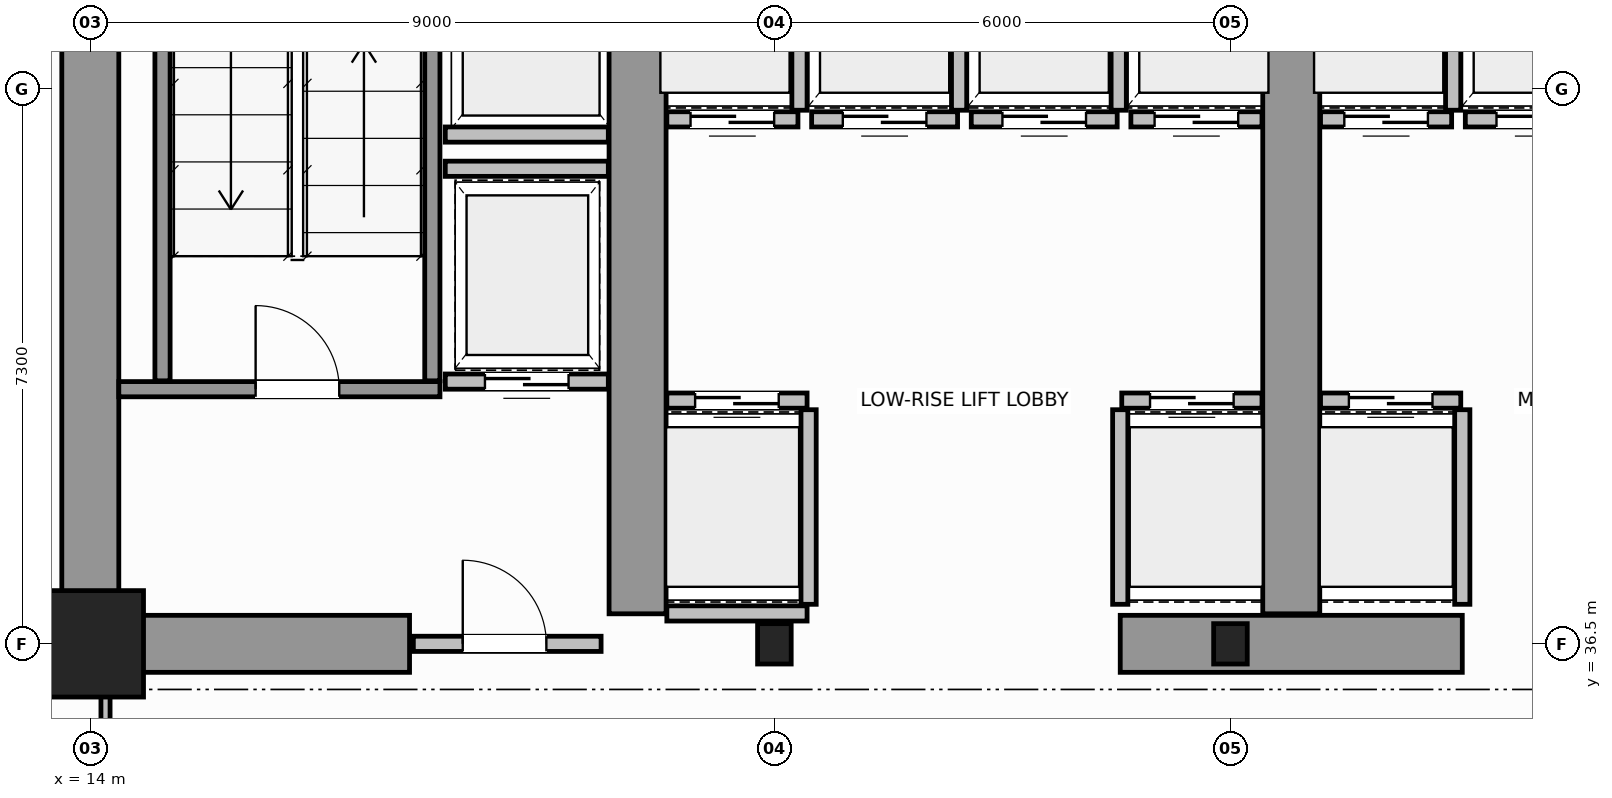
"""IFC4 building model, lengths in metres.
Left out: names, types, materials, properties, quantities, classifications, styles, units other than length and angle.
Written with IfcOpenShell. Run it as: python <this file> out.ifc"""

import sys

from ifc_helpers import new_model, si_unit, direction, frame, frame_2d, origin, origin_2d, place, context, subcontext, project, spatial, rectangle, i_section, extrude, source, transform, mapped, element, fill, save


model = new_model("IFC4")
c1 = context("Model", 3, precision=1e-05, world=origin(), true_north=direction((0.0, 1.0)))
c2 = subcontext(c1, "Body", "Model", "MODEL_VIEW")
j1 = project(units=[si_unit("LENGTHUNIT", "METRE"), si_unit("PLANEANGLEUNIT", "RADIAN")], contexts=[c1])
p1 = place(None, origin())
s1 = spatial("IfcSite", under=j1, at=p1, CompositionType="ELEMENT")
p2 = place(p1, origin())
s2 = spatial("IfcBuilding", under=s1, at=p2, CompositionType="ELEMENT")
p3 = place(p2, frame((0.0, 0.0, 99.6)))
s3 = spatial("IfcBuildingStorey", under=s2, at=p3, CompositionType="ELEMENT", Elevation=99.6)
m1 = source(origin(), c2, "Body", "SweptSolid", [
    extrude(rectangle(XDim=1.4, YDim=1.4, at=origin_2d()), origin(), (0.0, 0.0, 1.0), 3.8),
])
p4 = place(p3, frame((14.0, 36.5, 0.0), z_axis=(0.0, 0.0, 1.0), x_axis=(1.0, 0.0, 0.0)))
e1 = element("IfcColumn", 1, at=p4, inside=s3, PredefinedType="COLUMN", context=c2, shape_type="MappedRepresentation", body=[
    mapped(m1, transform((0.0, 0.0, 0.0), scale=1.0)),
])
m2 = source(origin(), c2, "Body", "SweptSolid", [
    extrude(i_section(OverallWidth=0.442, OverallDepth=0.531, WebThickness=0.065, FlangeThickness=0.076, FilletRadius=0.015, at=origin_2d()), origin(), (0.0, 0.0, 1.0), 3.8),
])
for number, where, z_axis, x_axis in (
    (2, (23.0, 36.5, 0.0), (0.0, 0.0, 1.0), (1.0, 0.0, 0.0)),
    (3, (29.0, 36.5, 0.0), (0.0, 0.0, 1.0), (1.0, 0.0, 0.0)),
):
    element("IfcColumn", number, at=place(p3, frame(where, z_axis=z_axis, x_axis=x_axis)), inside=s3, PredefinedType="COLUMN", context=c2, shape_type="MappedRepresentation", body=[
        mapped(m2, transform((0.0, 0.0, 0.0), scale=1.0)),
    ])
p5 = place(p3, frame((14.0, 36.5, 0.0), z_axis=(0.0, 0.0, 1.0), x_axis=(0.0, 1.0, 0.0)))
e4 = element("IfcWall", 4, at=p5, inside=s3, PredefinedType="SHEAR", context=c2, shape_type="SweptSolid", body=[
    extrude(rectangle(XDim=14.5, YDim=0.75, at=frame_2d((7.25, 0.0))), origin(), (0.0, 0.0, 1.0), 3.8),
])
p6 = place(p3, frame((14.395, 36.5, 0.0), z_axis=(0.0, 0.0, 1.0), x_axis=(1.0, 0.0, 0.0)))
e5 = element("IfcWall", 5, at=p6, inside=s3, PredefinedType="SHEAR", context=c2, shape_type="SweptSolid", body=[
    extrude(rectangle(XDim=3.805, YDim=0.75, at=frame_2d((1.902, 0.0))), origin(), (0.0, 0.0, 1.0), 2.38),
])
p7 = place(p3, frame((27.55, 36.5, 0.0), z_axis=(0.0, 0.0, 1.0), x_axis=(1.0, 0.0, 0.0)))
e6 = element("IfcWall", 6, at=p7, inside=s3, PredefinedType="SHEAR", context=c2, shape_type="SweptSolid", body=[
    extrude(rectangle(XDim=4.5, YDim=0.75, at=frame_2d((2.25, 0.0))), origin(), (0.0, 0.0, 1.0), 3.8),
])
for number, where, z_axis, x_axis in (
    (7, (21.2, 36.895, 0.0), (0.0, 0.0, 1.0), (0.0, 1.0, 0.0)),
    (8, (29.8, 36.895, 0.0), (0.0, 0.0, 1.0), (0.0, 1.0, 0.0)),
):
    element("IfcWall", number, at=place(p3, frame(where, z_axis=z_axis, x_axis=x_axis)), inside=s3, PredefinedType="SHEAR", context=c2, shape_type="SweptSolid", body=[
        extrude(rectangle(XDim=9.305, YDim=0.75, at=frame_2d((4.652, 0.0))), origin(), (0.0, 0.0, 1.0), 3.8),
    ])
p8 = place(p3, frame((14.375, 39.85, 0.0), z_axis=(0.0, 0.0, 1.0), x_axis=(1.0, 0.0, 0.0)))
e9 = element("IfcWall", 9, at=p8, inside=s3, PredefinedType="SOLIDWALL", context=c2, shape_type="SweptSolid", body=[
    extrude(rectangle(XDim=4.225, YDim=0.2, at=frame_2d((2.113, 0.0))), origin(), (0.0, 0.0, 1.0), 3.8),
])
p9 = place(p8, frame((1.8, 0.0, 0.0)))
e10 = element("IfcOpeningElement", 10, at=p9, cuts=e9, PredefinedType="OPENING", context=c2, shape_type="SweptSolid", body=[
    extrude(rectangle(XDim=1.1, YDim=2.15, at=frame_2d((0.55, 1.075))), frame((0.0, 0.11, 0.0), z_axis=(0.0, -1.0, 0.0), x_axis=(1.0, 0.0, 0.0)), (0.0, 0.0, 1.0), 0.22),
])
for number, where, z_axis, x_axis in (
    (11, (14.95, 39.96, 0.0), (0.0, 0.0, 1.0), (0.0, 1.0, 0.0)),
    (12, (18.5, 39.96, 0.0), (0.0, 0.0, 1.0), (0.0, 1.0, 0.0)),
):
    element("IfcWall", number, at=place(p3, frame(where, z_axis=z_axis, x_axis=x_axis)), inside=s3, PredefinedType="SOLIDWALL", context=c2, shape_type="SweptSolid", body=[
        extrude(rectangle(XDim=9.93, YDim=0.2, at=frame_2d((4.965, 0.0))), origin(), (0.0, 0.0, 1.0), 3.8),
    ])
p10 = place(p3, frame((18.25, 36.5, 0.0), z_axis=(0.0, 0.0, 1.0), x_axis=(1.0, 0.0, 0.0)))
e13 = element("IfcWall", 13, at=p10, inside=s3, PredefinedType="SOLIDWALL", context=c2, shape_type="SweptSolid", body=[
    extrude(rectangle(XDim=2.47, YDim=0.2, at=frame_2d((1.235, 0.0))), origin(), (0.0, 0.0, 1.0), 2.37),
])
p11 = place(p10, frame((0.65, 0.0, 0.0)))
e14 = element("IfcOpeningElement", 14, at=p11, cuts=e13, PredefinedType="OPENING", context=c2, shape_type="SweptSolid", body=[
    extrude(rectangle(XDim=1.1, YDim=2.15, at=frame_2d((0.55, 1.075))), frame((0.0, 0.11, 0.0), z_axis=(0.0, -1.0, 0.0), x_axis=(1.0, 0.0, 0.0)), (0.0, 0.0, 1.0), 0.22),
])
p12 = place(p3, frame((21.585, 39.7, 0.0), z_axis=(0.0, 0.0, 1.0), x_axis=(1.0, 0.0, 0.0)))
e15 = element("IfcWall", 15, at=p12, inside=s3, PredefinedType="SOLIDWALL", context=c2, shape_type="SweptSolid", body=[
    extrude(rectangle(XDim=1.845, YDim=0.2, at=frame_2d((0.922, 0.0))), origin(), (0.0, 0.0, 1.0), 3.58),
])
p13 = place(p12, frame((0.372, 0.0, 0.0)))
e16 = element("IfcOpeningElement", 16, at=p13, cuts=e15, PredefinedType="OPENING", context=c2, shape_type="SweptSolid", body=[
    extrude(rectangle(XDim=1.1, YDim=2.15, at=frame_2d((0.55, 1.075))), frame((0.0, 0.11, 0.0), z_axis=(0.0, -1.0, 0.0), x_axis=(1.0, 0.0, 0.0)), (0.0, 0.0, 1.0), 0.22),
])
p14 = place(p3, frame((21.585, 36.9, 0.0), z_axis=(0.0, 0.0, 1.0), x_axis=(1.0, 0.0, 0.0)))
e17 = element("IfcWall", 17, at=p14, inside=s3, PredefinedType="SOLIDWALL", context=c2, shape_type="SweptSolid", body=[
    extrude(rectangle(XDim=1.845, YDim=0.2, at=frame_2d((0.922, 0.0))), origin(), (0.0, 0.0, 1.0), 2.37),
])
p15 = place(p3, frame((23.45, 37.02, 0.0), z_axis=(0.0, 0.0, 1.0), x_axis=(0.0, 1.0, 0.0)))
e18 = element("IfcWall", 18, at=p15, inside=s3, PredefinedType="SOLIDWALL", context=c2, shape_type="SweptSolid", body=[
    extrude(rectangle(XDim=2.56, YDim=0.2, at=frame_2d((1.28, 0.0))), origin(), (0.0, 0.0, 1.0), 3.58),
])
p16 = place(p3, frame((27.57, 39.7, 0.0), z_axis=(0.0, 0.0, 1.0), x_axis=(1.0, 0.0, 0.0)))
e19 = element("IfcWall", 19, at=p16, inside=s3, PredefinedType="SOLIDWALL", context=c2, shape_type="SweptSolid", body=[
    extrude(rectangle(XDim=1.845, YDim=0.2, at=frame_2d((0.922, 0.0))), origin(), (0.0, 0.0, 1.0), 3.58),
])
p17 = place(p16, frame((0.372, 0.0, 0.0)))
e20 = element("IfcOpeningElement", 20, at=p17, cuts=e19, PredefinedType="OPENING", context=c2, shape_type="SweptSolid", body=[
    extrude(rectangle(XDim=1.1, YDim=2.15, at=frame_2d((0.55, 1.075))), frame((0.0, 0.11, 0.0), z_axis=(0.0, -1.0, 0.0), x_axis=(1.0, 0.0, 0.0)), (0.0, 0.0, 1.0), 0.22),
])
p18 = place(p3, frame((27.55, 37.02, 0.0), z_axis=(0.0, 0.0, 1.0), x_axis=(0.0, 1.0, 0.0)))
e21 = element("IfcWall", 21, at=p18, inside=s3, PredefinedType="SOLIDWALL", context=c2, shape_type="SweptSolid", body=[
    extrude(rectangle(XDim=2.56, YDim=0.2, at=frame_2d((1.28, 0.0))), origin(), (0.0, 0.0, 1.0), 3.58),
])
p19 = place(p3, frame((21.585, 43.4, 0.0), z_axis=(0.0, 0.0, 1.0), x_axis=(1.0, 0.0, 0.0)))
e22 = element("IfcWall", 22, at=p19, inside=s3, PredefinedType="SOLIDWALL", context=c2, shape_type="SweptSolid", body=[
    extrude(rectangle(XDim=1.725, YDim=0.2, at=frame_2d((0.863, 0.0))), origin(), (0.0, 0.0, 1.0), 3.58),
])
p20 = place(p19, frame((0.312, 0.0, 0.0)))
e23 = element("IfcOpeningElement", 23, at=p20, cuts=e22, PredefinedType="OPENING", context=c2, shape_type="SweptSolid", body=[
    extrude(rectangle(XDim=1.1, YDim=2.15, at=frame_2d((0.55, 1.075))), frame((0.0, 0.11, 0.0), z_axis=(0.0, -1.0, 0.0), x_axis=(1.0, 0.0, 0.0)), (0.0, 0.0, 1.0), 0.22),
])
p21 = place(p3, frame((23.33, 43.52, 0.0), z_axis=(0.0, 0.0, 1.0), x_axis=(0.0, 1.0, 0.0)))
e24 = element("IfcWall", 24, at=p21, inside=s3, PredefinedType="SOLIDWALL", context=c2, shape_type="SweptSolid", body=[
    extrude(rectangle(XDim=2.56, YDim=0.2, at=frame_2d((1.28, 0.0))), origin(), (0.0, 0.0, 1.0), 3.58),
])
p22 = place(p3, frame((23.49, 43.4, 0.0), z_axis=(0.0, 0.0, 1.0), x_axis=(1.0, 0.0, 0.0)))
e25 = element("IfcWall", 25, at=p22, inside=s3, PredefinedType="SOLIDWALL", context=c2, shape_type="SweptSolid", body=[
    extrude(rectangle(XDim=1.92, YDim=0.2, at=frame_2d((0.96, 0.0))), origin(), (0.0, 0.0, 1.0), 3.58),
])
p23 = place(p22, frame((0.41, 0.0, 0.0)))
e26 = element("IfcOpeningElement", 26, at=p23, cuts=e25, PredefinedType="OPENING", context=c2, shape_type="SweptSolid", body=[
    extrude(rectangle(XDim=1.1, YDim=2.15, at=frame_2d((0.55, 1.075))), frame((0.0, 0.11, 0.0), z_axis=(0.0, -1.0, 0.0), x_axis=(1.0, 0.0, 0.0)), (0.0, 0.0, 1.0), 0.22),
])
p24 = place(p3, frame((25.43, 43.52, 0.0), z_axis=(0.0, 0.0, 1.0), x_axis=(0.0, 1.0, 0.0)))
e27 = element("IfcWall", 27, at=p24, inside=s3, PredefinedType="SOLIDWALL", context=c2, shape_type="SweptSolid", body=[
    extrude(rectangle(XDim=2.56, YDim=0.2, at=frame_2d((1.28, 0.0))), origin(), (0.0, 0.0, 1.0), 3.58),
])
p25 = place(p3, frame((25.59, 43.4, 0.0), z_axis=(0.0, 0.0, 1.0), x_axis=(1.0, 0.0, 0.0)))
e28 = element("IfcWall", 28, at=p25, inside=s3, PredefinedType="SOLIDWALL", context=c2, shape_type="SweptSolid", body=[
    extrude(rectangle(XDim=1.92, YDim=0.2, at=frame_2d((0.96, 0.0))), origin(), (0.0, 0.0, 1.0), 3.58),
])
p26 = place(p25, frame((0.41, 0.0, 0.0)))
e29 = element("IfcOpeningElement", 29, at=p26, cuts=e28, PredefinedType="OPENING", context=c2, shape_type="SweptSolid", body=[
    extrude(rectangle(XDim=1.1, YDim=2.15, at=frame_2d((0.55, 1.075))), frame((0.0, 0.11, 0.0), z_axis=(0.0, -1.0, 0.0), x_axis=(1.0, 0.0, 0.0)), (0.0, 0.0, 1.0), 0.22),
])
p27 = place(p3, frame((27.53, 43.52, 0.0), z_axis=(0.0, 0.0, 1.0), x_axis=(0.0, 1.0, 0.0)))
e30 = element("IfcWall", 30, at=p27, inside=s3, PredefinedType="SOLIDWALL", context=c2, shape_type="SweptSolid", body=[
    extrude(rectangle(XDim=2.56, YDim=0.2, at=frame_2d((1.28, 0.0))), origin(), (0.0, 0.0, 1.0), 3.58),
])
p28 = place(p3, frame((27.69, 43.4, 0.0), z_axis=(0.0, 0.0, 1.0), x_axis=(1.0, 0.0, 0.0)))
e31 = element("IfcWall", 31, at=p28, inside=s3, PredefinedType="SOLIDWALL", context=c2, shape_type="SweptSolid", body=[
    extrude(rectangle(XDim=1.725, YDim=0.2, at=frame_2d((0.863, 0.0))), origin(), (0.0, 0.0, 1.0), 3.58),
])
p29 = place(p28, frame((0.312, 0.0, 0.0)))
e32 = element("IfcOpeningElement", 32, at=p29, cuts=e31, PredefinedType="OPENING", context=c2, shape_type="SweptSolid", body=[
    extrude(rectangle(XDim=1.1, YDim=2.15, at=frame_2d((0.55, 1.075))), frame((0.0, 0.11, 0.0), z_axis=(0.0, -1.0, 0.0), x_axis=(1.0, 0.0, 0.0)), (0.0, 0.0, 1.0), 0.22),
])
p30 = place(p3, frame((30.185, 39.7, 0.0), z_axis=(0.0, 0.0, 1.0), x_axis=(1.0, 0.0, 0.0)))
e33 = element("IfcWall", 33, at=p30, inside=s3, PredefinedType="SOLIDWALL", context=c2, shape_type="SweptSolid", body=[
    extrude(rectangle(XDim=1.845, YDim=0.2, at=frame_2d((0.922, 0.0))), origin(), (0.0, 0.0, 1.0), 3.58),
])
p31 = place(p30, frame((0.373, 0.0, 0.0)))
e34 = element("IfcOpeningElement", 34, at=p31, cuts=e33, PredefinedType="OPENING", context=c2, shape_type="SweptSolid", body=[
    extrude(rectangle(XDim=1.1, YDim=2.15, at=frame_2d((0.55, 1.075))), frame((0.0, 0.11, 0.0), z_axis=(0.0, -1.0, 0.0), x_axis=(1.0, 0.0, 0.0)), (0.0, 0.0, 1.0), 0.22),
])
p32 = place(p3, frame((32.05, 37.02, 0.0), z_axis=(0.0, 0.0, 1.0), x_axis=(0.0, 1.0, 0.0)))
e35 = element("IfcWall", 35, at=p32, inside=s3, PredefinedType="SOLIDWALL", context=c2, shape_type="SweptSolid", body=[
    extrude(rectangle(XDim=2.56, YDim=0.2, at=frame_2d((1.28, 0.0))), origin(), (0.0, 0.0, 1.0), 3.58),
])
p33 = place(p3, frame((30.185, 43.4, 0.0), z_axis=(0.0, 0.0, 1.0), x_axis=(1.0, 0.0, 0.0)))
e36 = element("IfcWall", 36, at=p33, inside=s3, PredefinedType="SOLIDWALL", context=c2, shape_type="SweptSolid", body=[
    extrude(rectangle(XDim=1.725, YDim=0.2, at=frame_2d((0.862, 0.0))), origin(), (0.0, 0.0, 1.0), 3.58),
])
p34 = place(p33, frame((0.313, 0.0, 0.0)))
e37 = element("IfcOpeningElement", 37, at=p34, cuts=e36, PredefinedType="OPENING", context=c2, shape_type="SweptSolid", body=[
    extrude(rectangle(XDim=1.1, YDim=2.15, at=frame_2d((0.55, 1.075))), frame((0.0, 0.11, 0.0), z_axis=(0.0, -1.0, 0.0), x_axis=(1.0, 0.0, 0.0)), (0.0, 0.0, 1.0), 0.22),
])
p35 = place(p3, frame((31.93, 43.52, 0.0), z_axis=(0.0, 0.0, 1.0), x_axis=(0.0, 1.0, 0.0)))
e38 = element("IfcWall", 38, at=p35, inside=s3, PredefinedType="SOLIDWALL", context=c2, shape_type="SweptSolid", body=[
    extrude(rectangle(XDim=2.56, YDim=0.2, at=frame_2d((1.28, 0.0))), origin(), (0.0, 0.0, 1.0), 3.58),
])
p36 = place(p3, frame((32.09, 43.4, 0.0), z_axis=(0.0, 0.0, 1.0), x_axis=(1.0, 0.0, 0.0)))
e39 = element("IfcWall", 39, at=p36, inside=s3, PredefinedType="SOLIDWALL", context=c2, shape_type="SweptSolid", body=[
    extrude(rectangle(XDim=1.92, YDim=0.2, at=frame_2d((0.96, 0.0))), origin(), (0.0, 0.0, 1.0), 3.58),
])
p37 = place(p36, frame((0.41, 0.0, 0.0)))
e40 = element("IfcOpeningElement", 40, at=p37, cuts=e39, PredefinedType="OPENING", context=c2, shape_type="SweptSolid", body=[
    extrude(rectangle(XDim=1.1, YDim=2.15, at=frame_2d((0.55, 1.075))), frame((0.0, 0.11, 0.0), z_axis=(0.0, -1.0, 0.0), x_axis=(1.0, 0.0, 0.0)), (0.0, 0.0, 1.0), 0.22),
])
p38 = place(p3, frame((18.67, 43.2, 0.0), z_axis=(0.0, 0.0, 1.0), x_axis=(1.0, 0.0, 0.0)))
e41 = element("IfcWall", 41, at=p38, inside=s3, PredefinedType="SOLIDWALL", context=c2, shape_type="SweptSolid", body=[
    extrude(rectangle(XDim=2.145, YDim=0.2, at=frame_2d((1.073, 0.0))), origin(), (0.0, 0.0, 1.0), 3.58),
])
p39 = place(p3, frame((18.67, 39.95, 0.0), z_axis=(0.0, 0.0, 1.0), x_axis=(1.0, 0.0, 0.0)))
e42 = element("IfcWall", 42, at=p39, inside=s3, PredefinedType="SOLIDWALL", context=c2, shape_type="SweptSolid", body=[
    extrude(rectangle(XDim=2.145, YDim=0.2, at=frame_2d((1.073, 0.0))), origin(), (0.0, 0.0, 1.0), 3.58),
])
p40 = place(p39, frame((0.522, 0.0, 0.0)))
e43 = element("IfcOpeningElement", 43, at=p40, cuts=e42, PredefinedType="OPENING", context=c2, shape_type="SweptSolid", body=[
    extrude(rectangle(XDim=1.1, YDim=2.15, at=frame_2d((0.55, 1.075))), frame((0.0, 0.11, 0.0), z_axis=(0.0, -1.0, 0.0), x_axis=(1.0, 0.0, 0.0)), (0.0, 0.0, 1.0), 0.22),
])
p41 = place(p3, frame((18.67, 42.75, 0.0), z_axis=(0.0, 0.0, 1.0), x_axis=(1.0, 0.0, 0.0)))
e44 = element("IfcWall", 44, at=p41, inside=s3, PredefinedType="SOLIDWALL", context=c2, shape_type="SweptSolid", body=[
    extrude(rectangle(XDim=2.145, YDim=0.2, at=frame_2d((1.073, 0.0))), origin(), (0.0, 0.0, 1.0), 3.58),
])
p42 = place(p3, frame((14.2, 34.16, 0.0), z_axis=(0.0, 0.0, 1.0), x_axis=(0.0, 1.0, 0.0)))
e45 = element("IfcWall", 45, at=p42, inside=s3, PredefinedType="PARTITIONING", context=c2, shape_type="SweptSolid", body=[
    extrude(rectangle(XDim=2.28, YDim=0.12, at=frame_2d((1.14, 0.0))), origin(), (0.0, 0.0, 1.0), 3.58),
])
p43 = place(p42, frame((0.3, 0.0, 0.0)))
e46 = element("IfcOpeningElement", 46, at=p43, cuts=e45, PredefinedType="OPENING", context=c2, shape_type="SweptSolid", body=[
    extrude(rectangle(XDim=0.9, YDim=2.15, at=frame_2d((0.45, 1.075))), frame((0.0, 0.07, 0.0), z_axis=(0.0, -1.0, 0.0), x_axis=(1.0, 0.0, 0.0)), (0.0, 0.0, 1.0), 0.14),
])
m3 = source(origin(), c2, "Body", "SweptSolid", [
    extrude(rectangle(XDim=1.1, YDim=2.15, at=frame_2d((0.55, 1.075))), frame((0.0, 0.025, 0.0), z_axis=(0.0, -1.0, 0.0), x_axis=(1.0, 0.0, 0.0)), (0.0, 0.0, 1.0), 0.05),
])
p44 = place(p9, origin())
e47 = element("IfcDoor", 47, at=p44, inside=s3, OperationType="SINGLE_SWING_LEFT", PredefinedType="DOOR", context=c2, shape_type="MappedRepresentation", body=[
    mapped(m3, transform((0.0, 0.0, 0.0), scale=1.0)),
])
fill(e10, e47)
p45 = place(p11, origin())
e48 = element("IfcDoor", 48, at=p45, inside=s3, OperationType="SINGLE_SWING_RIGHT", PredefinedType="DOOR", context=c2, shape_type="MappedRepresentation", body=[
    mapped(m3, transform((0.0, 0.0, 0.0), scale=1.0)),
])
fill(e14, e48)
p46 = place(p13, origin())
e49 = element("IfcDoor", 49, at=p46, inside=s3, OperationType="DOUBLE_DOOR_SLIDING", PredefinedType="DOOR", context=c2, shape_type="MappedRepresentation", body=[
    mapped(m3, transform((0.0, 0.0, 0.0), scale=1.0)),
])
fill(e16, e49)
p47 = place(p17, origin())
e50 = element("IfcDoor", 50, at=p47, inside=s3, OperationType="DOUBLE_DOOR_SLIDING", PredefinedType="DOOR", context=c2, shape_type="MappedRepresentation", body=[
    mapped(m3, transform((0.0, 0.0, 0.0), scale=1.0)),
])
fill(e20, e50)
p48 = place(p20, origin())
e51 = element("IfcDoor", 51, at=p48, inside=s3, OperationType="DOUBLE_DOOR_SLIDING", PredefinedType="DOOR", context=c2, shape_type="MappedRepresentation", body=[
    mapped(m3, transform((0.0, 0.0, 0.0), scale=1.0)),
])
fill(e23, e51)
p49 = place(p23, origin())
e52 = element("IfcDoor", 52, at=p49, inside=s3, OperationType="DOUBLE_DOOR_SLIDING", PredefinedType="DOOR", context=c2, shape_type="MappedRepresentation", body=[
    mapped(m3, transform((0.0, 0.0, 0.0), scale=1.0)),
])
fill(e26, e52)
p50 = place(p26, origin())
e53 = element("IfcDoor", 53, at=p50, inside=s3, OperationType="DOUBLE_DOOR_SLIDING", PredefinedType="DOOR", context=c2, shape_type="MappedRepresentation", body=[
    mapped(m3, transform((0.0, 0.0, 0.0), scale=1.0)),
])
fill(e29, e53)
p51 = place(p29, origin())
e54 = element("IfcDoor", 54, at=p51, inside=s3, OperationType="DOUBLE_DOOR_SLIDING", PredefinedType="DOOR", context=c2, shape_type="MappedRepresentation", body=[
    mapped(m3, transform((0.0, 0.0, 0.0), scale=1.0)),
])
fill(e32, e54)
p52 = place(p31, origin())
e55 = element("IfcDoor", 55, at=p52, inside=s3, OperationType="DOUBLE_DOOR_SLIDING", PredefinedType="DOOR", context=c2, shape_type="MappedRepresentation", body=[
    mapped(m3, transform((0.0, 0.0, 0.0), scale=1.0)),
])
fill(e34, e55)
p53 = place(p34, origin())
e56 = element("IfcDoor", 56, at=p53, inside=s3, OperationType="DOUBLE_DOOR_SLIDING", PredefinedType="DOOR", context=c2, shape_type="MappedRepresentation", body=[
    mapped(m3, transform((0.0, 0.0, 0.0), scale=1.0)),
])
fill(e37, e56)
p54 = place(p37, origin())
e57 = element("IfcDoor", 57, at=p54, inside=s3, OperationType="DOUBLE_DOOR_SLIDING", PredefinedType="DOOR", context=c2, shape_type="MappedRepresentation", body=[
    mapped(m3, transform((0.0, 0.0, 0.0), scale=1.0)),
])
fill(e40, e57)
p55 = place(p40, origin())
e58 = element("IfcDoor", 58, at=p55, inside=s3, OperationType="DOUBLE_DOOR_SLIDING", PredefinedType="DOOR", context=c2, shape_type="MappedRepresentation", body=[
    mapped(m3, transform((0.0, 0.0, 0.0), scale=1.0)),
])
fill(e43, e58)
save(model, sys.argv[1])
